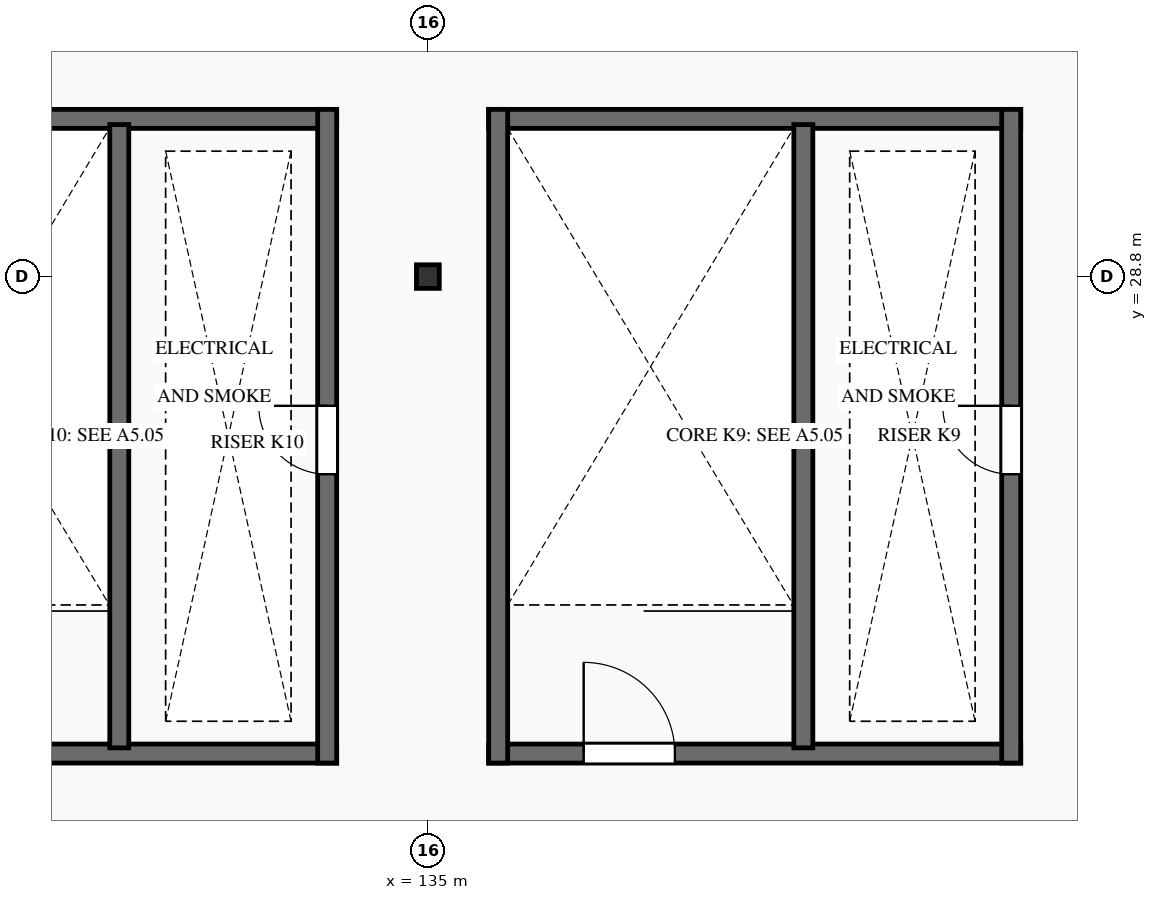
"""IFC4 building model, lengths in metres.
Left out: names, types, materials, properties, quantities, classifications, styles, units other than length and angle.
Written with IfcOpenShell. Run it as: python <this file> out.ifc"""

import sys

from ifc_helpers import new_model, si_unit, direction, frame, frame_2d, origin, origin_2d, place, context, subcontext, project, spatial, rectangle, i_section, extrude, element, fill, save


model = new_model("IFC4")
c1 = context("Model", 3, precision=1e-05, world=origin(), true_north=direction((0.0, 1.0)))
c2 = subcontext(c1, "Body", "Model", "MODEL_VIEW")
j1 = project(units=[si_unit("LENGTHUNIT", "METRE"), si_unit("PLANEANGLEUNIT", "RADIAN")], contexts=[c1])
p1 = place(None, origin())
s1 = spatial("IfcSite", under=j1, at=p1, CompositionType="ELEMENT")
p2 = place(p1, origin())
s2 = spatial("IfcBuilding", under=s1, at=p2, CompositionType="ELEMENT")
p3 = place(p2, frame((0.0, 0.0, 15.0)))
s3 = spatial("IfcBuildingStorey", under=s2, at=p3, CompositionType="ELEMENT", Elevation=15.0)
p4 = place(p3, frame((135.0, 28.8, 0.0), z_axis=(0.0, 0.0, 1.0), x_axis=(1.0, 0.0, 0.0)))
e1 = element("IfcColumn", 1, at=p4, inside=s3, PredefinedType="COLUMN", context=c2, shape_type="SweptSolid", body=[
    extrude(i_section(OverallWidth=0.3, OverallDepth=0.31, WebThickness=0.009, FlangeThickness=0.015, FilletRadius=0.027, at=origin_2d()), origin(), (0.0, 0.0, 1.0), 3.9),
])
p5 = place(p3, frame((135.8, 22.525, 0.0), z_axis=(0.0, 0.0, 1.0), x_axis=(1.0, 0.0, 0.0)))
e2 = element("IfcWall", 2, at=p5, inside=s3, PredefinedType="SHEAR", context=c2, shape_type="SweptSolid", body=[
    extrude(rectangle(XDim=7.0, YDim=0.25, at=frame_2d((3.5, 0.0))), origin(), (0.0, 0.0, 1.0), 3.9),
])
p6 = place(p5, frame((1.25, 0.0, 0.0)))
e3 = element("IfcOpeningElement", 3, at=p6, cuts=e2, PredefinedType="OPENING", context=c2, shape_type="SweptSolid", body=[
    extrude(rectangle(XDim=1.2, YDim=2.15, at=frame_2d((0.6, 1.075))), frame((0.0, 0.14, 0.0), z_axis=(0.0, -1.0, 0.0), x_axis=(1.0, 0.0, 0.0)), (0.0, 0.0, 1.0), 0.28),
])
p7 = place(p3, frame((135.8, 30.875, 0.0), z_axis=(0.0, 0.0, 1.0), x_axis=(1.0, 0.0, 0.0)))
e4 = element("IfcWall", 4, at=p7, inside=s3, PredefinedType="SHEAR", context=c2, shape_type="SweptSolid", body=[
    extrude(rectangle(XDim=7.0, YDim=0.25, at=frame_2d((3.5, 0.0))), origin(), (0.0, 0.0, 1.0), 3.9),
])
p8 = place(p3, frame((135.925, 22.4, 0.0), z_axis=(0.0, 0.0, 1.0), x_axis=(0.0, 1.0, 0.0)))
e5 = element("IfcWall", 5, at=p8, inside=s3, PredefinedType="SHEAR", context=c2, shape_type="SweptSolid", body=[
    extrude(rectangle(XDim=8.6, YDim=0.25, at=frame_2d((4.3, 0.0))), origin(), (0.0, 0.0, 1.0), 3.9),
])
p9 = place(p3, frame((142.675, 22.4, 0.0), z_axis=(0.0, 0.0, 1.0), x_axis=(0.0, 1.0, 0.0)))
e6 = element("IfcWall", 6, at=p9, inside=s3, PredefinedType="SHEAR", context=c2, shape_type="SweptSolid", body=[
    extrude(rectangle(XDim=8.6, YDim=0.25, at=frame_2d((4.3, 0.0))), origin(), (0.0, 0.0, 1.0), 3.9),
])
p10 = place(p9, frame((3.8, 0.0, 0.0)))
e7 = element("IfcOpeningElement", 7, at=p10, cuts=e6, PredefinedType="OPENING", context=c2, shape_type="SweptSolid", body=[
    extrude(rectangle(XDim=0.9, YDim=2.05, at=frame_2d((0.45, 1.025))), frame((0.0, 0.14, 0.0), z_axis=(0.0, -1.0, 0.0), x_axis=(1.0, 0.0, 0.0)), (0.0, 0.0, 1.0), 0.28),
])
p11 = place(p3, frame((139.94, 22.6, 0.0), z_axis=(0.0, 0.0, 1.0), x_axis=(0.0, 1.0, 0.0)))
e8 = element("IfcWall", 8, at=p11, inside=s3, PredefinedType="SHEAR", context=c2, shape_type="SweptSolid", body=[
    extrude(rectangle(XDim=8.2, YDim=0.25, at=frame_2d((4.1, 0.0))), origin(), (0.0, 0.0, 1.0), 3.9),
])
p12 = place(p3, frame((126.8, 22.525, 0.0), z_axis=(0.0, 0.0, 1.0), x_axis=(1.0, 0.0, 0.0)))
e9 = element("IfcWall", 9, at=p12, inside=s3, PredefinedType="SHEAR", context=c2, shape_type="SweptSolid", body=[
    extrude(rectangle(XDim=7.0, YDim=0.25, at=frame_2d((3.5, 0.0))), origin(), (0.0, 0.0, 1.0), 3.9),
])
p13 = place(p12, frame((1.25, 0.0, 0.0)))
e10 = element("IfcOpeningElement", 10, at=p13, cuts=e9, PredefinedType="OPENING", context=c2, shape_type="SweptSolid", body=[
    extrude(rectangle(XDim=1.2, YDim=2.15, at=frame_2d((0.6, 1.075))), frame((0.0, 0.14, 0.0), z_axis=(0.0, -1.0, 0.0), x_axis=(1.0, 0.0, 0.0)), (0.0, 0.0, 1.0), 0.28),
])
p14 = place(p3, frame((126.8, 30.875, 0.0), z_axis=(0.0, 0.0, 1.0), x_axis=(1.0, 0.0, 0.0)))
e11 = element("IfcWall", 11, at=p14, inside=s3, PredefinedType="SHEAR", context=c2, shape_type="SweptSolid", body=[
    extrude(rectangle(XDim=7.0, YDim=0.25, at=frame_2d((3.5, 0.0))), origin(), (0.0, 0.0, 1.0), 3.9),
])
p15 = place(p3, frame((133.675, 22.4, 0.0), z_axis=(0.0, 0.0, 1.0), x_axis=(0.0, 1.0, 0.0)))
e12 = element("IfcWall", 12, at=p15, inside=s3, PredefinedType="SHEAR", context=c2, shape_type="SweptSolid", body=[
    extrude(rectangle(XDim=8.6, YDim=0.25, at=frame_2d((4.3, 0.0))), origin(), (0.0, 0.0, 1.0), 3.9),
])
p16 = place(p15, frame((3.8, 0.0, 0.0)))
e13 = element("IfcOpeningElement", 13, at=p16, cuts=e12, PredefinedType="OPENING", context=c2, shape_type="SweptSolid", body=[
    extrude(rectangle(XDim=0.9, YDim=2.05, at=frame_2d((0.45, 1.025))), frame((0.0, 0.14, 0.0), z_axis=(0.0, -1.0, 0.0), x_axis=(1.0, 0.0, 0.0)), (0.0, 0.0, 1.0), 0.28),
])
p17 = place(p3, frame((130.94, 22.6, 0.0), z_axis=(0.0, 0.0, 1.0), x_axis=(0.0, 1.0, 0.0)))
e14 = element("IfcWall", 14, at=p17, inside=s3, PredefinedType="SHEAR", context=c2, shape_type="SweptSolid", body=[
    extrude(rectangle(XDim=8.2, YDim=0.25, at=frame_2d((4.1, 0.0))), origin(), (0.0, 0.0, 1.0), 3.9),
])
p18 = place(p6, origin())
e15 = element("IfcDoor", 15, at=p18, inside=s3, OperationType="SINGLE_SWING_LEFT", PredefinedType="DOOR", context=c2, shape_type="SweptSolid", body=[
    extrude(rectangle(XDim=1.2, YDim=2.15, at=frame_2d((0.6, 1.075))), frame((0.0, 0.025, 0.0), z_axis=(0.0, -1.0, 0.0), x_axis=(1.0, 0.0, 0.0)), (0.0, 0.0, 1.0), 0.05),
])
fill(e3, e15)
p19 = place(p10, origin())
e16 = element("IfcDoor", 16, at=p19, inside=s3, OperationType="SINGLE_SWING_RIGHT", PredefinedType="DOOR", context=c2, shape_type="SweptSolid", body=[
    extrude(rectangle(XDim=0.9, YDim=2.05, at=frame_2d((0.45, 1.025))), frame((0.0, 0.025, 0.0), z_axis=(0.0, -1.0, 0.0), x_axis=(1.0, 0.0, 0.0)), (0.0, 0.0, 1.0), 0.05),
])
fill(e7, e16)
p20 = place(p16, origin())
e17 = element("IfcDoor", 17, at=p20, inside=s3, OperationType="SINGLE_SWING_RIGHT", PredefinedType="DOOR", context=c2, shape_type="SweptSolid", body=[
    extrude(rectangle(XDim=0.9, YDim=2.05, at=frame_2d((0.45, 1.025))), frame((0.0, 0.025, 0.0), z_axis=(0.0, -1.0, 0.0), x_axis=(1.0, 0.0, 0.0)), (0.0, 0.0, 1.0), 0.05),
])
fill(e13, e17)
save(model, sys.argv[1])
